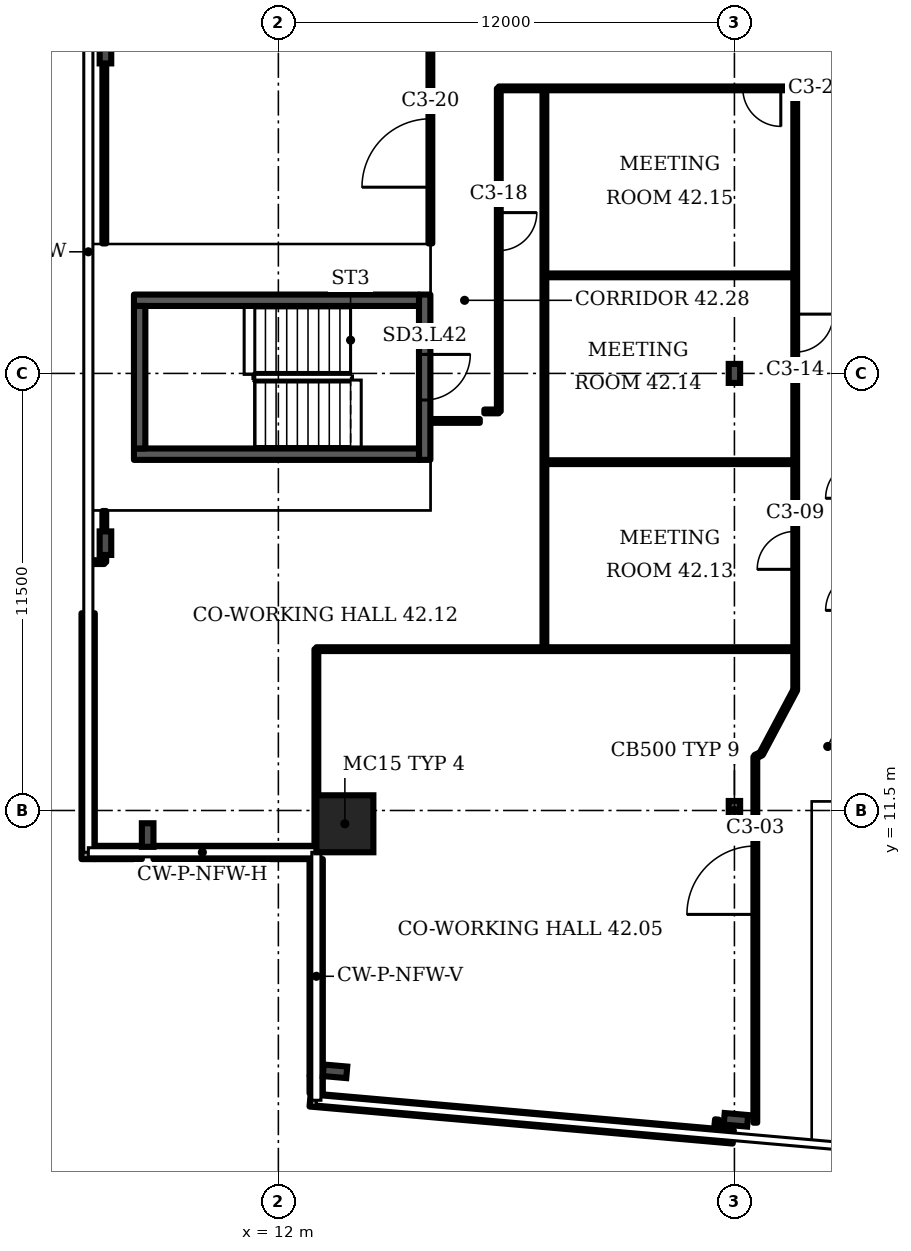
"""IFC4 building model, lengths in metres.
Left out: names, types, materials, properties, quantities, classifications, styles, units other than length and angle.
Written with IfcOpenShell. Run it as: python <this file> out.ifc"""

import sys

from ifc_helpers import new_model, si_unit, direction, frame, frame_2d, origin, origin_2d, place, context, subcontext, project, spatial, rectangle, i_section, extrude, element, fill, save


model = new_model("IFC4")
c1 = context("Model", 3, precision=1e-05, world=origin(), true_north=direction((0.0, 1.0)))
c2 = subcontext(c1, "Body", "Model", "MODEL_VIEW")
j1 = project(units=[si_unit("LENGTHUNIT", "METRE"), si_unit("PLANEANGLEUNIT", "RADIAN")], contexts=[c1])
p1 = place(None, origin())
s1 = spatial("IfcSite", under=j1, at=p1, CompositionType="ELEMENT")
p2 = place(p1, origin())
s2 = spatial("IfcBuilding", under=s1, at=p2, CompositionType="ELEMENT")
p3 = place(p2, frame((0.0, 0.0, 173.5)))
s3 = spatial("IfcBuildingStorey", under=s2, at=p3, CompositionType="ELEMENT", Elevation=173.5)
p4 = place(p3, frame((13.75, 11.15, 0.0), z_axis=(0.0, 0.0, 1.0), x_axis=(1.0, 0.0, 0.0)))
e1 = element("IfcColumn", 1, at=p4, inside=s3, PredefinedType="COLUMN", context=c2, shape_type="SweptSolid", body=[
    extrude(rectangle(XDim=1.5, YDim=1.5, at=origin_2d()), origin(), (0.0, 0.0, 1.0), 3.6),
])
for number, where, z_axis, x_axis in (
    (2, (13.491, 4.637, 0.0), (0.0, 0.0, 1.0), (-0.087, -0.996, 0.0)),
    (3, (24.039, 3.361, 0.0), (0.0, 0.0, 1.0), (-0.087, -0.996, 0.0)),
    (4, (7.45, 31.467, 0.0), (0.0, 0.0, 1.0), (-1.0, 0.0, 0.0)),
    (5, (7.45, 18.533, 0.0), (0.0, 0.0, 1.0), (-1.0, 0.0, 0.0)),
    (6, (8.561, 10.854, 0.0), (0.0, 0.0, 1.0), (-1.0, 0.0, 0.0)),
):
    element("IfcColumn", number, at=place(p3, frame(where, z_axis=z_axis, x_axis=x_axis)), inside=s3, PredefinedType="COLUMN", context=c2, shape_type="SweptSolid", body=[
        extrude(i_section(OverallWidth=0.305, OverallDepth=0.62, WebThickness=0.021, FlangeThickness=0.04, FilletRadius=0.027, at=origin_2d()), origin(), (0.0, 0.0, 1.0), 3.6),
    ])
for number, where, z_axis, x_axis in (
    (7, (24.0, 11.5, 0.0), (0.0, 0.0, 1.0), (1.0, 0.0, 0.0)),
    (8, (24.0, 23.0, 0.0), (0.0, 0.0, 1.0), (1.0, 0.0, 0.0)),
):
    element("IfcColumn", number, at=place(p3, frame(where, z_axis=z_axis, x_axis=x_axis)), inside=s3, PredefinedType="COLUMN", context=c2, shape_type="SweptSolid", body=[
        extrude(i_section(OverallWidth=0.3, OverallDepth=0.5, WebThickness=0.014, FlangeThickness=0.028, FilletRadius=0.027, at=origin_2d()), origin(), (0.0, 0.0, 1.0), 3.6),
    ])
p5 = place(p3, frame((12.835, 3.885, 0.0), z_axis=(0.0, 0.0, 1.0), x_axis=(0.996199, -0.087154, 0.0)))
e9 = element("IfcWall", 9, at=p5, inside=s3, PredefinedType="SOLIDWALL", context=c2, shape_type="SweptSolid", body=[
    extrude(rectangle(XDim=11.177, YDim=0.35, at=frame_2d((5.588, 0.0))), origin(), (0.0, 0.0, 1.0), 1.0),
])
p6 = place(p3, frame((6.995, 16.69, 0.0), z_axis=(0.0, 0.0, 1.0), x_axis=(0.0, -1.0, 0.0)))
e10 = element("IfcWall", 10, at=p6, inside=s3, PredefinedType="SOLIDWALL", context=c2, shape_type="SweptSolid", body=[
    extrude(rectangle(XDim=6.47, YDim=0.35, at=frame_2d((3.235, 0.0))), origin(), (0.0, 0.0, 1.0), 1.0),
])
p7 = place(p3, frame((7.17, 10.395, 0.0), z_axis=(0.0, 0.0, 1.0), x_axis=(1.0, 0.0, 0.0)))
e11 = element("IfcWall", 11, at=p7, inside=s3, PredefinedType="SOLIDWALL", context=c2, shape_type="SweptSolid", body=[
    extrude(rectangle(XDim=1.238, YDim=0.35, at=frame_2d((0.619, 0.0))), origin(), (0.0, 0.0, 1.0), 1.0),
])
p8 = place(p3, frame((8.713, 10.395, 0.0), z_axis=(0.0, 0.0, 1.0), x_axis=(1.0, 0.0, 0.0)))
e12 = element("IfcWall", 12, at=p8, inside=s3, PredefinedType="SOLIDWALL", context=c2, shape_type="SweptSolid", body=[
    extrude(rectangle(XDim=4.287, YDim=0.35, at=frame_2d((2.143, 0.0))), origin(), (0.0, 0.0, 1.0), 1.0),
])
p9 = place(p3, frame((12.995, 10.22, 0.0), z_axis=(0.0, 0.0, 1.0), x_axis=(0.0, -1.0, 0.0)))
e13 = element("IfcWall", 13, at=p9, inside=s3, PredefinedType="SOLIDWALL", context=c2, shape_type="SweptSolid", body=[
    extrude(rectangle(XDim=5.693, YDim=0.35, at=frame_2d((2.847, 0.0))), origin(), (0.0, 0.0, 1.0), 1.0),
])
p10 = place(p3, frame((12.995, 4.512, 0.0), z_axis=(0.0, 0.0, 1.0), x_axis=(0.0, -1.0, 0.0)))
e14 = element("IfcWall", 14, at=p10, inside=s3, PredefinedType="SOLIDWALL", context=c2, shape_type="SweptSolid", body=[
    extrude(rectangle(XDim=0.454, YDim=0.35, at=frame_2d((0.227, 0.0))), origin(), (0.0, 0.0, 1.0), 1.0),
])
p11 = place(p3, frame((15.85, 20.725, 0.0), z_axis=(0.0, 0.0, 1.0), x_axis=(0.0, 1.0, 0.0)))
e15 = element("IfcWall", 15, at=p11, inside=s3, PredefinedType="SHEAR", context=c2, shape_type="SweptSolid", body=[
    extrude(rectangle(XDim=4.35, YDim=0.3, at=frame_2d((2.175, 0.0))), origin(), (0.0, 0.0, 1.0), 3.2),
])
p12 = place(p11, frame((1.575, 0.0, 0.0)))
e16 = element("IfcOpeningElement", 16, at=p12, cuts=e15, PredefinedType="OPENING", context=c2, shape_type="SweptSolid", body=[
    extrude(rectangle(XDim=1.2, YDim=2.1, at=frame_2d((0.6, 1.05))), frame((0.0, 0.16, 0.0), z_axis=(0.0, -1.0, 0.0), x_axis=(1.0, 0.0, 0.0)), (0.0, 0.0, 1.0), 0.32),
])
p13 = place(p3, frame((7.02, 18.035, 0.0), z_axis=(0.0, 0.0, 1.0), x_axis=(1.0, 0.0, 0.0)))
e17 = element("IfcWall", 17, at=p13, inside=s3, PredefinedType="PARTITIONING", context=c2, shape_type="SweptSolid", body=[
    extrude(rectangle(XDim=0.4, YDim=0.1, at=frame_2d((0.2, 0.0))), origin(), (0.0, 0.0, 1.0), 3.2),
])
p14 = place(p3, frame((7.42, 18.035, 0.0), z_axis=(0.0, 0.0, 1.0), x_axis=(0.0, 1.0, 0.0)))
e18 = element("IfcWall", 18, at=p14, inside=s3, PredefinedType="PARTITIONING", context=c2, shape_type="SweptSolid", body=[
    extrude(rectangle(XDim=1.345, YDim=0.1, at=frame_2d((0.672, 0.0))), origin(), (0.0, 0.0, 1.0), 2.58),
])
p15 = place(p3, frame((7.42, 26.42, 0.0), z_axis=(0.0, 0.0, 1.0), x_axis=(0.0, 1.0, 0.0)))
e19 = element("IfcWall", 19, at=p15, inside=s3, PredefinedType="PARTITIONING", context=c2, shape_type="SweptSolid", body=[
    extrude(rectangle(XDim=15.56, YDim=0.1, at=frame_2d((7.78, 0.0))), origin(), (0.0, 0.0, 1.0), 2.58),
])
p16 = place(p3, frame((13.0, 10.42, 0.0), z_axis=(0.0, 0.0, 1.0), x_axis=(0.0, 1.0, 0.0)))
e20 = element("IfcWall", 20, at=p16, inside=s3, PredefinedType="PARTITIONING", context=c2, shape_type="SweptSolid", body=[
    extrude(rectangle(XDim=5.325, YDim=0.1, at=frame_2d((2.663, 0.0))), origin(), (0.0, 0.0, 1.0), 3.2),
])
p17 = place(p3, frame((13.0, 15.745, 0.0), z_axis=(0.0, 0.0, 1.0), x_axis=(1.0, 0.0, 0.0)))
e21 = element("IfcWall", 21, at=p17, inside=s3, PredefinedType="PARTITIONING", context=c2, shape_type="SweptSolid", body=[
    extrude(rectangle(XDim=12.6, YDim=0.1, at=frame_2d((6.3, 0.0))), origin(), (0.0, 0.0, 1.0), 3.2),
])
p18 = place(p3, frame((16.0, 26.42, 0.0), z_axis=(0.0, 0.0, 1.0), x_axis=(0.0, 1.0, 0.0)))
e22 = element("IfcWall", 22, at=p18, inside=s3, PredefinedType="PARTITIONING", context=c2, shape_type="SweptSolid", body=[
    extrude(rectangle(XDim=7.56, YDim=0.1, at=frame_2d((3.78, 0.0))), origin(), (0.0, 0.0, 1.0), 3.2),
])
p19 = place(p18, frame((1.48, 0.0, 0.0)))
e23 = element("IfcOpeningElement", 23, at=p19, cuts=e22, PredefinedType="OPENING", context=c2, shape_type="SweptSolid", body=[
    extrude(rectangle(XDim=1.8, YDim=2.1, at=frame_2d((0.9, 1.05))), frame((0.0, 0.06, 0.0), z_axis=(0.0, -1.0, 0.0), x_axis=(1.0, 0.0, 0.0)), (0.0, 0.0, 1.0), 0.12),
])
p20 = place(p3, frame((16.02, 21.75, 0.0), z_axis=(0.0, 0.0, 1.0), x_axis=(1.0, 0.0, 0.0)))
e24 = element("IfcWall", 24, at=p20, inside=s3, PredefinedType="PARTITIONING", context=c2, shape_type="SweptSolid", body=[
    extrude(rectangle(XDim=1.28, YDim=0.1, at=frame_2d((0.64, 0.0))), origin(), (0.0, 0.0, 1.0), 3.2),
])
p21 = place(p3, frame((17.42, 22.0, 0.0), z_axis=(0.0, 0.0, 1.0), x_axis=(1.0, 0.0, 0.0)))
e25 = element("IfcWall", 25, at=p21, inside=s3, PredefinedType="PARTITIONING", context=c2, shape_type="SweptSolid", body=[
    extrude(rectangle(XDim=0.38, YDim=0.1, at=frame_2d((0.19, 0.0))), origin(), (0.0, 0.0, 1.0), 3.2),
])
p22 = place(p3, frame((17.8, 22.0, 0.0), z_axis=(0.0, 0.0, 1.0), x_axis=(0.0, 1.0, 0.0)))
e26 = element("IfcWall", 26, at=p22, inside=s3, PredefinedType="PARTITIONING", context=c2, shape_type="SweptSolid", body=[
    extrude(rectangle(XDim=8.5, YDim=0.1, at=frame_2d((4.25, 0.0))), origin(), (0.0, 0.0, 1.0), 3.2),
])
p23 = place(p22, frame((4.231, 0.0, 0.0)))
e27 = element("IfcOpeningElement", 27, at=p23, cuts=e26, PredefinedType="OPENING", context=c2, shape_type="SweptSolid", body=[
    extrude(rectangle(XDim=1.0, YDim=2.1, at=frame_2d((0.5, 1.05))), frame((0.0, 0.06, 0.0), z_axis=(0.0, -1.0, 0.0), x_axis=(1.0, 0.0, 0.0)), (0.0, 0.0, 1.0), 0.12),
])
p24 = place(p3, frame((17.8, 30.5, 0.0), z_axis=(0.0, 0.0, 1.0), x_axis=(1.0, 0.0, 0.0)))
e28 = element("IfcWall", 28, at=p24, inside=s3, PredefinedType="PARTITIONING", context=c2, shape_type="SweptSolid", body=[
    extrude(rectangle(XDim=7.8, YDim=0.1, at=frame_2d((3.9, 0.0))), origin(), (0.0, 0.0, 1.0), 3.2),
])
p25 = place(p24, frame((6.42, 0.0, 0.0)))
e29 = element("IfcOpeningElement", 29, at=p25, cuts=e28, PredefinedType="OPENING", context=c2, shape_type="SweptSolid", body=[
    extrude(rectangle(XDim=1.0, YDim=2.1, at=frame_2d((0.5, 1.05))), frame((0.0, 0.06, 0.0), z_axis=(0.0, -1.0, 0.0), x_axis=(1.0, 0.0, 0.0)), (0.0, 0.0, 1.0), 0.12),
])
p26 = place(p3, frame((19.0, 15.745, 0.0), z_axis=(0.0, 0.0, 1.0), x_axis=(0.0, 1.0, 0.0)))
e30 = element("IfcWall", 30, at=p26, inside=s3, PredefinedType="PARTITIONING", context=c2, shape_type="SweptSolid", body=[
    extrude(rectangle(XDim=14.755, YDim=0.1, at=frame_2d((7.377, 0.0))), origin(), (0.0, 0.0, 1.0), 3.2),
])
for number, where, z_axis, x_axis in (
    (31, (19.0, 20.665, 0.0), (0.0, 0.0, 1.0), (1.0, 0.0, 0.0)),
    (32, (19.0, 25.58, 0.0), (0.0, 0.0, 1.0), (1.0, 0.0, 0.0)),
):
    element("IfcWall", number, at=place(p3, frame(where, z_axis=z_axis, x_axis=x_axis)), inside=s3, PredefinedType="PARTITIONING", context=c2, shape_type="SweptSolid", body=[
        extrude(rectangle(XDim=6.6, YDim=0.1, at=frame_2d((3.3, 0.0))), origin(), (0.0, 0.0, 1.0), 3.2),
    ])
p27 = place(p3, frame((23.502, 2.976, 0.0), z_axis=(0.0, 0.0, 1.0), x_axis=(0.095654, 0.995419, 0.0)))
e33 = element("IfcWall", 33, at=p27, inside=s3, PredefinedType="PARTITIONING", context=c2, shape_type="SweptSolid", body=[
    extrude(rectangle(XDim=0.396, YDim=0.1, at=frame_2d((0.198, 0.0))), origin(), (0.0, 0.0, 1.0), 3.2),
])
p28 = place(p3, frame((24.55, 12.915, 0.0), z_axis=(0.0, 0.0, 1.0), x_axis=(0.900306, 0.435266, 0.0)))
e34 = element("IfcWall", 34, at=p28, inside=s3, PredefinedType="PARTITIONING", context=c2, shape_type="SweptSolid", body=[
    extrude(rectangle(XDim=0.172, YDim=0.1, at=frame_2d((0.086, 0.0))), origin(), (0.0, 0.0, 1.0), 3.2),
])
p29 = place(p3, frame((24.55, 3.285, 0.0), z_axis=(0.0, 0.0, 1.0), x_axis=(0.0, 1.0, 0.0)))
e35 = element("IfcWall", 35, at=p29, inside=s3, PredefinedType="PARTITIONING", context=c2, shape_type="SweptSolid", body=[
    extrude(rectangle(XDim=9.63, YDim=0.1, at=frame_2d((4.815, 0.0))), origin(), (0.0, 0.0, 1.0), 3.2),
])
p30 = place(p29, frame((5.481, 0.0, 0.0)))
e36 = element("IfcOpeningElement", 36, at=p30, cuts=e35, PredefinedType="OPENING", context=c2, shape_type="SweptSolid", body=[
    extrude(rectangle(XDim=1.8, YDim=2.1, at=frame_2d((0.9, 1.05))), frame((0.0, 0.06, 0.0), z_axis=(0.0, -1.0, 0.0), x_axis=(1.0, 0.0, 0.0)), (0.0, 0.0, 1.0), 0.12),
])
p31 = place(p3, frame((24.705, 12.99, 0.0), z_axis=(0.0, 0.0, 1.0), x_axis=(0.4702, 0.882555, 0.0)))
e37 = element("IfcWall", 37, at=p31, inside=s3, PredefinedType="PARTITIONING", context=c2, shape_type="SweptSolid", body=[
    extrude(rectangle(XDim=1.904, YDim=0.1, at=frame_2d((0.952, 0.0))), origin(), (0.0, 0.0, 1.0), 3.2),
])
p32 = place(p3, frame((25.6, 14.67, 0.0), z_axis=(0.0, 0.0, 1.0), x_axis=(0.0, 1.0, 0.0)))
e38 = element("IfcWall", 38, at=p32, inside=s3, PredefinedType="PARTITIONING", context=c2, shape_type="SweptSolid", body=[
    extrude(rectangle(XDim=15.83, YDim=0.1, at=frame_2d((7.915, 0.0))), origin(), (0.0, 0.0, 1.0), 3.2),
])
p33 = place(p32, frame((3.175, 0.0, 0.0)))
e39 = element("IfcOpeningElement", 39, at=p33, cuts=e38, PredefinedType="OPENING", context=c2, shape_type="SweptSolid", body=[
    extrude(rectangle(XDim=1.0, YDim=2.1, at=frame_2d((0.5, 1.05))), frame((0.0, 0.06, 0.0), z_axis=(0.0, -1.0, 0.0), x_axis=(1.0, 0.0, 0.0)), (0.0, 0.0, 1.0), 0.12),
])
p34 = place(p32, frame((8.89, 0.0, 0.0)))
e40 = element("IfcOpeningElement", 40, at=p34, cuts=e38, PredefinedType="OPENING", context=c2, shape_type="SweptSolid", body=[
    extrude(rectangle(XDim=1.0, YDim=2.1, at=frame_2d((0.5, 1.05))), frame((0.0, 0.06, 0.0), z_axis=(0.0, -1.0, 0.0), x_axis=(1.0, 0.0, 0.0)), (0.0, 0.0, 1.0), 0.12),
])
for number, where, z_axis, x_axis in (
    (41, (8.2, 20.875, 0.0), (0.0, 0.0, 1.0), (1.0, 0.0, 0.0)),
    (42, (8.2, 24.925, 0.0), (0.0, 0.0, 1.0), (1.0, 0.0, 0.0)),
):
    element("IfcWall", number, at=place(p3, frame(where, z_axis=z_axis, x_axis=x_axis)), inside=s3, PredefinedType="SHEAR", context=c2, shape_type="SweptSolid", body=[
        extrude(rectangle(XDim=7.5, YDim=0.3, at=frame_2d((3.75, 0.0))), origin(), (0.0, 0.0, 1.0), 3.2),
    ])
p35 = place(p3, frame((8.35, 21.025, 0.0), z_axis=(0.0, 0.0, 1.0), x_axis=(0.0, 1.0, 0.0)))
e43 = element("IfcWall", 43, at=p35, inside=s3, PredefinedType="SHEAR", context=c2, shape_type="SweptSolid", body=[
    extrude(rectangle(XDim=3.75, YDim=0.3, at=frame_2d((1.875, 0.0))), origin(), (0.0, 0.0, 1.0), 3.2),
])
p36 = place(p12, origin())
e44 = element("IfcDoor", 44, at=p36, inside=s3, OperationType="SINGLE_SWING_RIGHT", PredefinedType="DOOR", context=c2, shape_type="SweptSolid", body=[
    extrude(rectangle(XDim=1.2, YDim=2.1, at=frame_2d((0.6, 1.05))), frame((0.0, 0.025, 0.0), z_axis=(0.0, -1.0, 0.0), x_axis=(1.0, 0.0, 0.0)), (0.0, 0.0, 1.0), 0.05),
])
fill(e16, e44)
p37 = place(p30, origin())
e45 = element("IfcDoor", 45, at=p37, inside=s3, OperationType="DOUBLE_DOOR_SINGLE_SWING", PredefinedType="DOOR", context=c2, shape_type="SweptSolid", body=[
    extrude(rectangle(XDim=1.8, YDim=2.1, at=frame_2d((0.9, 1.05))), frame((0.0, 0.025, 0.0), z_axis=(0.0, -1.0, 0.0), x_axis=(1.0, 0.0, 0.0)), (0.0, 0.0, 1.0), 0.05),
])
fill(e36, e45)
p38 = place(p33, origin())
e46 = element("IfcDoor", 46, at=p38, inside=s3, OperationType="SINGLE_SWING_LEFT", PredefinedType="DOOR", context=c2, shape_type="SweptSolid", body=[
    extrude(rectangle(XDim=1.0, YDim=2.1, at=frame_2d((0.5, 1.05))), frame((0.0, 0.025, 0.0), z_axis=(0.0, -1.0, 0.0), x_axis=(1.0, 0.0, 0.0)), (0.0, 0.0, 1.0), 0.05),
])
fill(e39, e46)
p39 = place(p34, origin())
e47 = element("IfcDoor", 47, at=p39, inside=s3, OperationType="SINGLE_SWING_RIGHT", PredefinedType="DOOR", context=c2, shape_type="SweptSolid", body=[
    extrude(rectangle(XDim=1.0, YDim=2.1, at=frame_2d((0.5, 1.05))), frame((0.0, 0.025, 0.0), z_axis=(0.0, -1.0, 0.0), x_axis=(1.0, 0.0, 0.0)), (0.0, 0.0, 1.0), 0.05),
])
fill(e40, e47)
p40 = place(p23, origin())
e48 = element("IfcDoor", 48, at=p40, inside=s3, OperationType="SINGLE_SWING_RIGHT", PredefinedType="DOOR", context=c2, shape_type="SweptSolid", body=[
    extrude(rectangle(XDim=1.0, YDim=2.1, at=frame_2d((0.5, 1.05))), frame((0.0, 0.025, 0.0), z_axis=(0.0, -1.0, 0.0), x_axis=(1.0, 0.0, 0.0)), (0.0, 0.0, 1.0), 0.05),
])
fill(e27, e48)
p41 = place(p19, origin())
e49 = element("IfcDoor", 49, at=p41, inside=s3, OperationType="DOUBLE_DOOR_SINGLE_SWING", PredefinedType="DOOR", context=c2, shape_type="SweptSolid", body=[
    extrude(rectangle(XDim=1.8, YDim=2.1, at=frame_2d((0.9, 1.05))), frame((0.0, 0.025, 0.0), z_axis=(0.0, -1.0, 0.0), x_axis=(1.0, 0.0, 0.0)), (0.0, 0.0, 1.0), 0.05),
])
fill(e23, e49)
p42 = place(p25, origin())
e50 = element("IfcDoor", 50, at=p42, inside=s3, OperationType="SINGLE_SWING_RIGHT", PredefinedType="DOOR", context=c2, shape_type="SweptSolid", body=[
    extrude(rectangle(XDim=1.0, YDim=2.1, at=frame_2d((0.5, 1.05))), frame((0.0, 0.025, 0.0), z_axis=(0.0, -1.0, 0.0), x_axis=(1.0, 0.0, 0.0)), (0.0, 0.0, 1.0), 0.05),
])
fill(e29, e50)
save(model, sys.argv[1])
